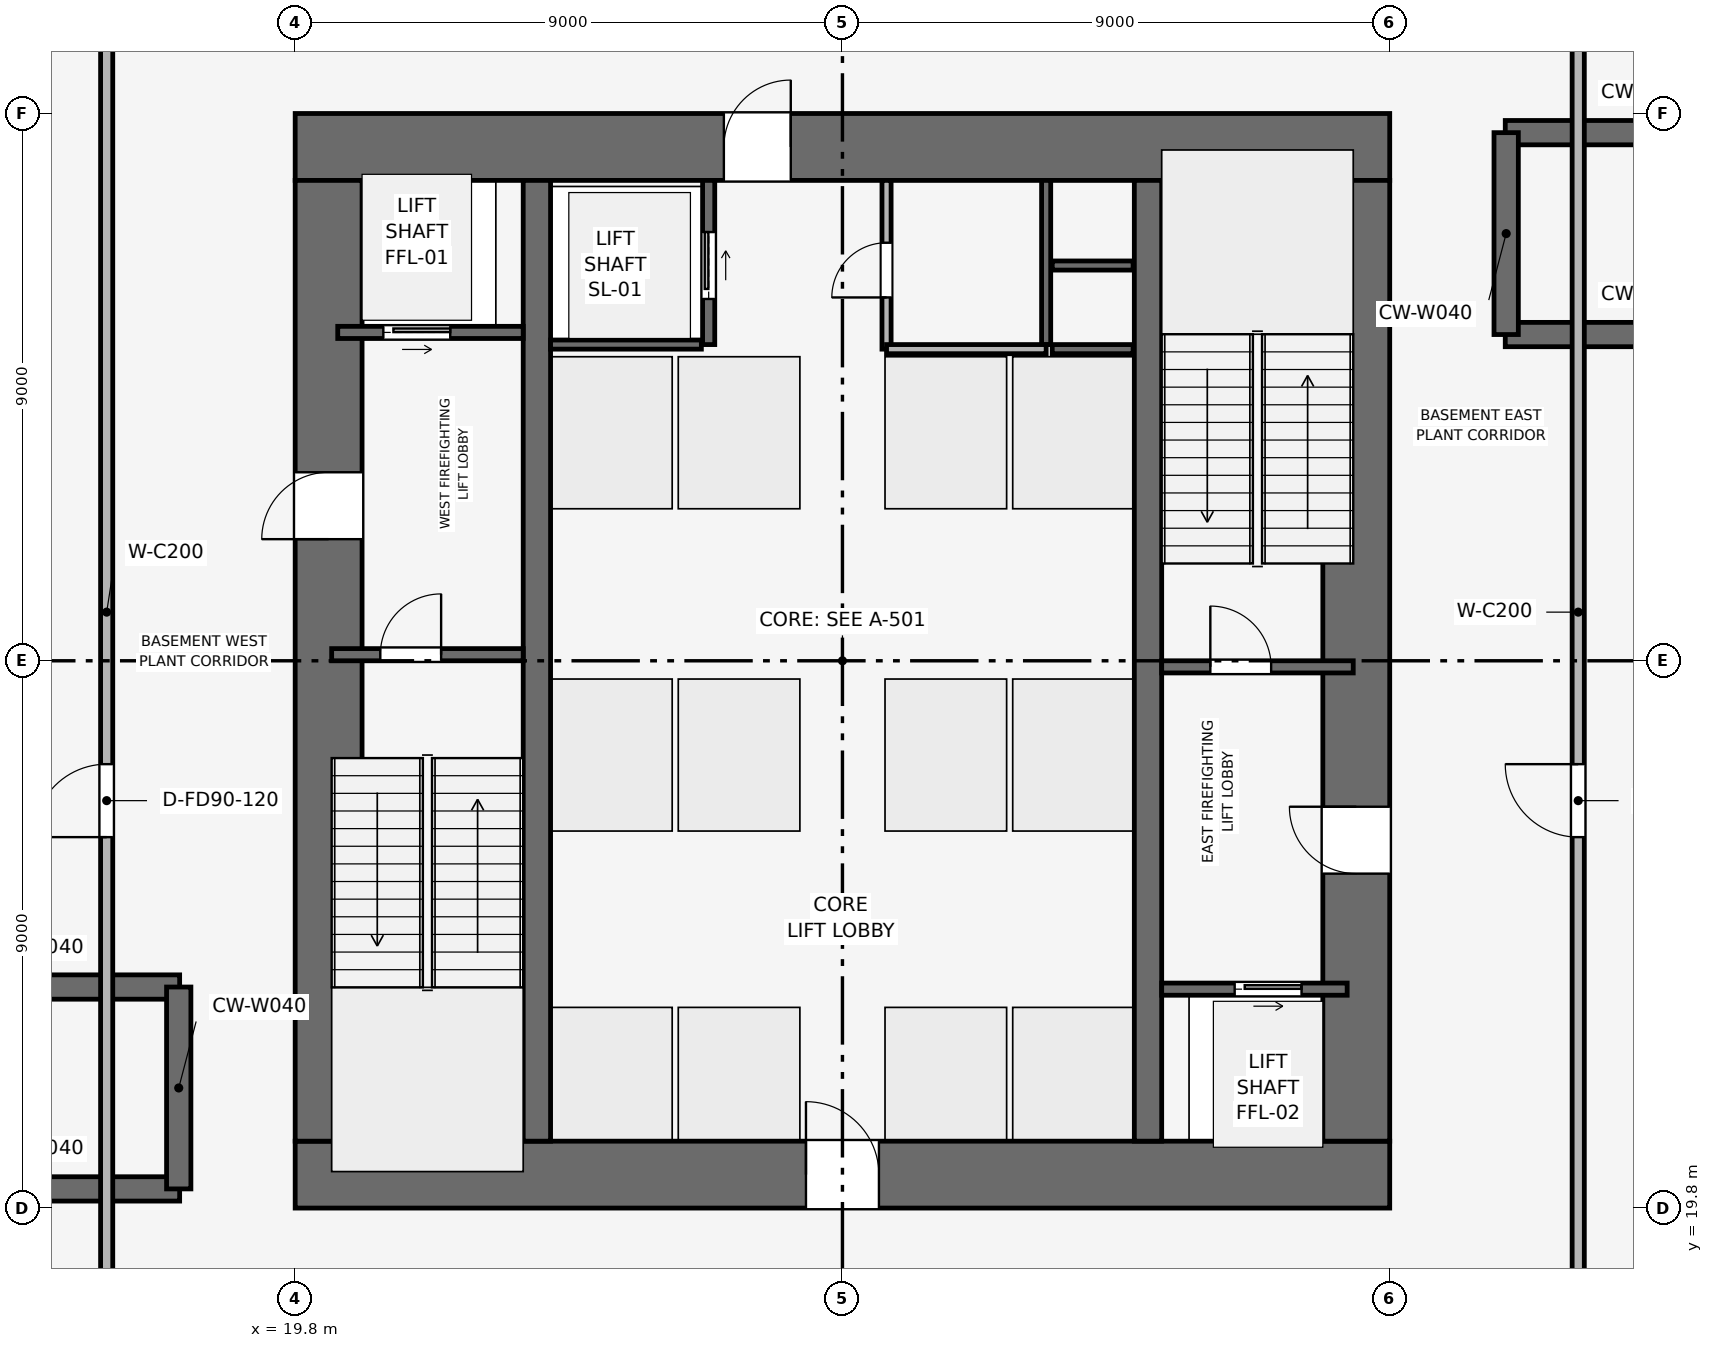
"""IFC4 building model, lengths in metres.
Left out: names, types, materials, properties, quantities, classifications, styles, units other than length and angle.
Written with IfcOpenShell. Run it as: python <this file> out.ifc"""

import sys

from ifc_helpers import new_model, si_unit, direction, frame, frame_2d, origin, place, context, subcontext, project, spatial, rectangle, extrude, element, fill, save


model = new_model("IFC4")
c1 = context("Model", 3, precision=1e-05, world=origin(), true_north=direction((0.0, 1.0)))
c2 = subcontext(c1, "Body", "Model", "MODEL_VIEW")
j1 = project(units=[si_unit("LENGTHUNIT", "METRE"), si_unit("PLANEANGLEUNIT", "RADIAN")], contexts=[c1])
p1 = place(None, origin())
s1 = spatial("IfcSite", under=j1, at=p1, CompositionType="ELEMENT")
p2 = place(p1, origin())
s2 = spatial("IfcBuilding", under=s1, at=p2, CompositionType="ELEMENT")
p3 = place(p2, frame((0.0, 0.0, -9.6)))
s3 = spatial("IfcBuildingStorey", under=s2, at=p3, CompositionType="ELEMENT", Elevation=-9.6)
p4 = place(p3, frame((19.8, 20.35, 0.0), z_axis=(0.0, 0.0, 1.0), x_axis=(1.0, 0.0, 0.0)))
e1 = element("IfcWall", 1, at=p4, inside=s3, PredefinedType="SHEAR", context=c2, shape_type="SweptSolid", body=[
    extrude(rectangle(XDim=18.0, YDim=1.1, at=frame_2d((9.0, 0.0))), origin(), (0.0, 0.0, 1.0), 4.8),
])
p5 = place(p4, frame((8.4, 0.0, 0.0)))
e2 = element("IfcOpeningElement", 2, at=p5, cuts=e1, PredefinedType="OPENING", context=c2, shape_type="SweptSolid", body=[
    extrude(rectangle(XDim=1.2, YDim=2.2, at=frame_2d((0.6, 1.1))), frame((0.0, 0.56, 0.0), z_axis=(0.0, -1.0, 0.0), x_axis=(1.0, 0.0, 0.0)), (0.0, 0.0, 1.0), 1.12),
])
p6 = place(p3, frame((19.8, 37.25, 0.0), z_axis=(0.0, 0.0, 1.0), x_axis=(1.0, 0.0, 0.0)))
e3 = element("IfcWall", 3, at=p6, inside=s3, PredefinedType="SHEAR", context=c2, shape_type="SweptSolid", body=[
    extrude(rectangle(XDim=18.0, YDim=1.1, at=frame_2d((9.0, 0.0))), origin(), (0.0, 0.0, 1.0), 4.8),
])
p7 = place(p6, frame((7.05, 0.0, 0.0)))
e4 = element("IfcOpeningElement", 4, at=p7, cuts=e3, PredefinedType="OPENING", context=c2, shape_type="SweptSolid", body=[
    extrude(rectangle(XDim=1.1, YDim=2.15, at=frame_2d((0.55, 1.075))), frame((0.0, 0.56, 0.0), z_axis=(0.0, -1.0, 0.0), x_axis=(1.0, 0.0, 0.0)), (0.0, 0.0, 1.0), 1.12),
])
p8 = place(p3, frame((20.35, 20.9, 0.0), z_axis=(0.0, 0.0, 1.0), x_axis=(0.0, 1.0, 0.0)))
e5 = element("IfcWall", 5, at=p8, inside=s3, PredefinedType="SHEAR", context=c2, shape_type="SweptSolid", body=[
    extrude(rectangle(XDim=15.8, YDim=1.1, at=frame_2d((7.9, 0.0))), origin(), (0.0, 0.0, 1.0), 4.8),
])
p9 = place(p8, frame((9.9, 0.0, 0.0)))
e6 = element("IfcOpeningElement", 6, at=p9, cuts=e5, PredefinedType="OPENING", context=c2, shape_type="SweptSolid", body=[
    extrude(rectangle(XDim=1.1, YDim=2.15, at=frame_2d((0.55, 1.075))), frame((0.0, 0.56, 0.0), z_axis=(0.0, -1.0, 0.0), x_axis=(1.0, 0.0, 0.0)), (0.0, 0.0, 1.0), 1.12),
])
p10 = place(p3, frame((37.25, 20.9, 0.0), z_axis=(0.0, 0.0, 1.0), x_axis=(0.0, 1.0, 0.0)))
e7 = element("IfcWall", 7, at=p10, inside=s3, PredefinedType="SHEAR", context=c2, shape_type="SweptSolid", body=[
    extrude(rectangle(XDim=15.8, YDim=1.1, at=frame_2d((7.9, 0.0))), origin(), (0.0, 0.0, 1.0), 4.8),
])
p11 = place(p10, frame((4.4, 0.0, 0.0)))
e8 = element("IfcOpeningElement", 8, at=p11, cuts=e7, PredefinedType="OPENING", context=c2, shape_type="SweptSolid", body=[
    extrude(rectangle(XDim=1.1, YDim=2.15, at=frame_2d((0.55, 1.075))), frame((0.0, 0.56, 0.0), z_axis=(0.0, -1.0, 0.0), x_axis=(1.0, 0.0, 0.0)), (0.0, 0.0, 1.0), 1.12),
])
for number, where, z_axis, x_axis in (
    (9, (23.775, 20.9, 0.0), (0.0, 0.0, 1.0), (0.0, 1.0, 0.0)),
    (10, (33.825, 20.9, 0.0), (0.0, 0.0, 1.0), (0.0, 1.0, 0.0)),
):
    element("IfcWall", number, at=place(p3, frame(where, z_axis=z_axis, x_axis=x_axis)), inside=s3, PredefinedType="SHEAR", context=c2, shape_type="SweptSolid", body=[
        extrude(rectangle(XDim=15.8, YDim=0.45, at=frame_2d((7.9, 0.0))), origin(), (0.0, 0.0, 1.0), 4.8),
    ])
for number, where, z_axis, x_axis in (
    (11, (13.2, 20.115, 0.0), (0.0, 0.0, 1.0), (1.0, 0.0, 0.0)),
    (12, (13.2, 23.435, 0.0), (0.0, 0.0, 1.0), (1.0, 0.0, 0.0)),
):
    element("IfcWall", number, at=place(p3, frame(where, z_axis=z_axis, x_axis=x_axis)), inside=s3, PredefinedType="SHEAR", context=c2, shape_type="SweptSolid", body=[
        extrude(rectangle(XDim=4.7, YDim=0.4, at=frame_2d((2.35, 0.0))), origin(), (0.0, 0.0, 1.0), 4.448),
    ])
p12 = place(p3, frame((17.885, 20.115, 0.0), z_axis=(0.0, 0.0, 1.0), x_axis=(0.0, 1.0, 0.0)))
e13 = element("IfcWall", 13, at=p12, inside=s3, PredefinedType="SHEAR", context=c2, shape_type="SweptSolid", body=[
    extrude(rectangle(XDim=3.32, YDim=0.4, at=frame_2d((1.66, 0.0))), origin(), (0.0, 0.0, 1.0), 4.448),
])
for number, where, z_axis, x_axis in (
    (14, (39.7, 34.165, 0.0), (0.0, 0.0, 1.0), (1.0, 0.0, 0.0)),
    (15, (39.7, 37.485, 0.0), (0.0, 0.0, 1.0), (1.0, 0.0, 0.0)),
):
    element("IfcWall", number, at=place(p3, frame(where, z_axis=z_axis, x_axis=x_axis)), inside=s3, PredefinedType="SHEAR", context=c2, shape_type="SweptSolid", body=[
        extrude(rectangle(XDim=4.7, YDim=0.4, at=frame_2d((2.35, 0.0))), origin(), (0.0, 0.0, 1.0), 4.448),
    ])
p13 = place(p3, frame((39.715, 34.165, 0.0), z_axis=(0.0, 0.0, 1.0), x_axis=(0.0, 1.0, 0.0)))
e16 = element("IfcWall", 16, at=p13, inside=s3, PredefinedType="SHEAR", context=c2, shape_type="SweptSolid", body=[
    extrude(rectangle(XDim=3.32, YDim=0.4, at=frame_2d((1.66, 0.0))), origin(), (0.0, 0.0, 1.0), 4.448),
])
p14 = place(p3, frame((20.4, 28.9, 0.0), z_axis=(0.0, 0.0, 1.0), x_axis=(1.0, 0.0, 0.0)))
e17 = element("IfcWall", 17, at=p14, inside=s3, PredefinedType="SHEAR", context=c2, shape_type="SweptSolid", body=[
    extrude(rectangle(XDim=3.15, YDim=0.2, at=frame_2d((1.575, 0.0))), origin(), (0.0, 0.0, 1.0), 4.45),
])
p15 = place(p14, frame((0.8, 0.0, 0.0)))
e18 = element("IfcOpeningElement", 18, at=p15, cuts=e17, PredefinedType="OPENING", context=c2, shape_type="SweptSolid", body=[
    extrude(rectangle(XDim=1.0, YDim=2.1, at=frame_2d((0.5, 1.05))), frame((0.0, 0.11, 0.0), z_axis=(0.0, -1.0, 0.0), x_axis=(1.0, 0.0, 0.0)), (0.0, 0.0, 1.0), 0.22),
])
p16 = place(p3, frame((34.05, 28.7, 0.0), z_axis=(0.0, 0.0, 1.0), x_axis=(1.0, 0.0, 0.0)))
e19 = element("IfcWall", 19, at=p16, inside=s3, PredefinedType="SHEAR", context=c2, shape_type="SweptSolid", body=[
    extrude(rectangle(XDim=3.15, YDim=0.2, at=frame_2d((1.575, 0.0))), origin(), (0.0, 0.0, 1.0), 4.45),
])
p17 = place(p16, frame((0.8, 0.0, 0.0)))
e20 = element("IfcOpeningElement", 20, at=p17, cuts=e19, PredefinedType="OPENING", context=c2, shape_type="SweptSolid", body=[
    extrude(rectangle(XDim=1.0, YDim=2.1, at=frame_2d((0.5, 1.05))), frame((0.0, 0.11, 0.0), z_axis=(0.0, -1.0, 0.0), x_axis=(1.0, 0.0, 0.0)), (0.0, 0.0, 1.0), 0.22),
])
p18 = place(p3, frame((32.15, 34.0, 0.0), z_axis=(0.0, 0.0, 1.0), x_axis=(0.0, 1.0, 0.0)))
e21 = element("IfcWall", 21, at=p18, inside=s3, PredefinedType="SHEAR", context=c2, shape_type="SweptSolid", body=[
    extrude(rectangle(XDim=2.7, YDim=0.15, at=frame_2d((1.35, 0.0))), origin(), (0.0, 0.0, 1.0), 4.45),
])
for number, where, z_axis, x_axis in (
    (22, (32.25, 33.925, 0.0), (0.0, 0.0, 1.0), (1.0, 0.0, 0.0)),
    (23, (32.25, 35.3, 0.0), (0.0, 0.0, 1.0), (1.0, 0.0, 0.0)),
):
    element("IfcWall", number, at=place(p3, frame(where, z_axis=z_axis, x_axis=x_axis)), inside=s3, PredefinedType="SHEAR", context=c2, shape_type="SweptSolid", body=[
        extrude(rectangle(XDim=1.33, YDim=0.15, at=frame_2d((0.665, 0.0))), origin(), (0.0, 0.0, 1.0), 4.45),
    ])
p19 = place(p3, frame((20.5, 34.2, 0.0), z_axis=(0.0, 0.0, 1.0), x_axis=(1.0, 0.0, 0.0)))
e24 = element("IfcWall", 24, at=p19, inside=s3, PredefinedType="SHEAR", context=c2, shape_type="SweptSolid", body=[
    extrude(rectangle(XDim=3.05, YDim=0.2, at=frame_2d((1.525, 0.0))), origin(), (0.0, 0.0, 1.0), 4.45),
])
p20 = place(p19, frame((0.75, 0.0, 0.0)))
e25 = element("IfcOpeningElement", 25, at=p20, cuts=e24, PredefinedType="OPENING", context=c2, shape_type="SweptSolid", body=[
    extrude(rectangle(XDim=1.1, YDim=2.15, at=frame_2d((0.55, 1.075))), frame((0.0, 0.11, 0.0), z_axis=(0.0, -1.0, 0.0), x_axis=(1.0, 0.0, 0.0)), (0.0, 0.0, 1.0), 0.22),
])
p21 = place(p3, frame((34.05, 23.4, 0.0), z_axis=(0.0, 0.0, 1.0), x_axis=(1.0, 0.0, 0.0)))
e26 = element("IfcWall", 26, at=p21, inside=s3, PredefinedType="SHEAR", context=c2, shape_type="SweptSolid", body=[
    extrude(rectangle(XDim=3.05, YDim=0.2, at=frame_2d((1.525, 0.0))), origin(), (0.0, 0.0, 1.0), 4.45),
])
p22 = place(p21, frame((1.2, 0.0, 0.0)))
e27 = element("IfcOpeningElement", 27, at=p22, cuts=e26, PredefinedType="OPENING", context=c2, shape_type="SweptSolid", body=[
    extrude(rectangle(XDim=1.1, YDim=2.15, at=frame_2d((0.55, 1.075))), frame((0.0, 0.11, 0.0), z_axis=(0.0, -1.0, 0.0), x_axis=(1.0, 0.0, 0.0)), (0.0, 0.0, 1.0), 0.22),
])
p23 = place(p3, frame((26.6, 34.0, 0.0), z_axis=(0.0, 0.0, 1.0), x_axis=(0.0, 1.0, 0.0)))
e28 = element("IfcWall", 28, at=p23, inside=s3, PredefinedType="SHEAR", context=c2, shape_type="SweptSolid", body=[
    extrude(rectangle(XDim=2.7, YDim=0.2, at=frame_2d((1.35, 0.0))), origin(), (0.0, 0.0, 1.0), 4.45),
])
p24 = place(p23, frame((0.75, 0.0, 0.0)))
e29 = element("IfcOpeningElement", 29, at=p24, cuts=e28, PredefinedType="OPENING", context=c2, shape_type="SweptSolid", body=[
    extrude(rectangle(XDim=1.1, YDim=2.15, at=frame_2d((0.55, 1.075))), frame((0.0, 0.11, 0.0), z_axis=(0.0, -1.0, 0.0), x_axis=(1.0, 0.0, 0.0)), (0.0, 0.0, 1.0), 0.22),
])
p25 = place(p3, frame((24.0, 34.0, 0.0), z_axis=(0.0, 0.0, 1.0), x_axis=(1.0, 0.0, 0.0)))
e30 = element("IfcWall", 30, at=p25, inside=s3, PredefinedType="SHEAR", context=c2, shape_type="SweptSolid", body=[
    extrude(rectangle(XDim=2.48, YDim=0.15, at=frame_2d((1.24, 0.0))), origin(), (0.0, 0.0, 1.0), 4.45),
])
p26 = place(p3, frame((29.525, 33.925, 0.0), z_axis=(0.0, 0.0, 1.0), x_axis=(0.0, 1.0, 0.0)))
e31 = element("IfcWall", 31, at=p26, inside=s3, PredefinedType="PARTITIONING", context=c2, shape_type="SweptSolid", body=[
    extrude(rectangle(XDim=2.775, YDim=0.15, at=frame_2d((1.387, 0.0))), origin(), (0.0, 0.0, 1.0), 4.45),
])
p27 = place(p26, frame((0.85, 0.0, 0.0)))
e32 = element("IfcOpeningElement", 32, at=p27, cuts=e31, PredefinedType="OPENING", context=c2, shape_type="SweptSolid", body=[
    extrude(rectangle(XDim=0.9, YDim=2.1, at=frame_2d((0.45, 1.05))), frame((0.0, 0.085, 0.0), z_axis=(0.0, -1.0, 0.0), x_axis=(1.0, 0.0, 0.0)), (0.0, 0.0, 1.0), 0.17),
])
p28 = place(p3, frame((29.525, 33.925, 0.0), z_axis=(0.0, 0.0, 1.0), x_axis=(1.0, 0.0, 0.0)))
e33 = element("IfcWall", 33, at=p28, inside=s3, PredefinedType="PARTITIONING", context=c2, shape_type="SweptSolid", body=[
    extrude(rectangle(XDim=2.625, YDim=0.15, at=frame_2d((1.312, 0.0))), origin(), (0.0, 0.0, 1.0), 4.45),
])
p29 = place(p3, frame((16.7, 16.7, 0.0), z_axis=(0.0, 0.0, 1.0), x_axis=(0.0, 1.0, 0.0)))
e34 = element("IfcWall", 34, at=p29, inside=s3, PredefinedType="PARTITIONING", context=c2, shape_type="SweptSolid", body=[
    extrude(rectangle(XDim=24.2, YDim=0.2, at=frame_2d((12.1, 0.0))), origin(), (0.0, 0.0, 1.0), 3.035),
])
p30 = place(p29, frame((9.2, 0.0, 0.0)))
e35 = element("IfcOpeningElement", 35, at=p30, cuts=e34, PredefinedType="OPENING", context=c2, shape_type="SweptSolid", body=[
    extrude(rectangle(XDim=1.2, YDim=2.2, at=frame_2d((0.6, 1.1))), frame((0.0, 0.11, 0.0), z_axis=(0.0, -1.0, 0.0), x_axis=(1.0, 0.0, 0.0)), (0.0, 0.0, 1.0), 0.22),
])
p31 = place(p3, frame((40.9, 16.7, 0.0), z_axis=(0.0, 0.0, 1.0), x_axis=(0.0, 1.0, 0.0)))
e36 = element("IfcWall", 36, at=p31, inside=s3, PredefinedType="PARTITIONING", context=c2, shape_type="SweptSolid", body=[
    extrude(rectangle(XDim=24.2, YDim=0.2, at=frame_2d((12.1, 0.0))), origin(), (0.0, 0.0, 1.0), 3.035),
])
p32 = place(p31, frame((9.2, 0.0, 0.0)))
e37 = element("IfcOpeningElement", 37, at=p32, cuts=e36, PredefinedType="OPENING", context=c2, shape_type="SweptSolid", body=[
    extrude(rectangle(XDim=1.2, YDim=2.2, at=frame_2d((0.6, 1.1))), frame((0.0, 0.11, 0.0), z_axis=(0.0, -1.0, 0.0), x_axis=(1.0, 0.0, 0.0)), (0.0, 0.0, 1.0), 0.22),
])
p33 = place(p15, origin())
e38 = element("IfcDoor", 38, at=p33, inside=s3, OperationType="SINGLE_SWING_RIGHT", PredefinedType="DOOR", context=c2, shape_type="SweptSolid", body=[
    extrude(rectangle(XDim=1.0, YDim=2.1, at=frame_2d((0.5, 1.05))), frame((0.0, 0.025, 0.0), z_axis=(0.0, -1.0, 0.0), x_axis=(1.0, 0.0, 0.0)), (0.0, 0.0, 1.0), 0.05),
])
fill(e18, e38)
p34 = place(p17, origin())
e39 = element("IfcDoor", 39, at=p34, inside=s3, OperationType="SINGLE_SWING_LEFT", PredefinedType="DOOR", context=c2, shape_type="SweptSolid", body=[
    extrude(rectangle(XDim=1.0, YDim=2.1, at=frame_2d((0.5, 1.05))), frame((0.0, 0.025, 0.0), z_axis=(0.0, -1.0, 0.0), x_axis=(1.0, 0.0, 0.0)), (0.0, 0.0, 1.0), 0.05),
])
fill(e20, e39)
p35 = place(p20, origin())
e40 = element("IfcDoor", 40, at=p35, inside=s3, OperationType="SLIDING_TO_RIGHT", PredefinedType="DOOR", context=c2, shape_type="SweptSolid", body=[
    extrude(rectangle(XDim=1.1, YDim=2.15, at=frame_2d((0.55, 1.075))), frame((0.0, 0.025, 0.0), z_axis=(0.0, -1.0, 0.0), x_axis=(1.0, 0.0, 0.0)), (0.0, 0.0, 1.0), 0.05),
])
fill(e25, e40)
p36 = place(p22, origin())
e41 = element("IfcDoor", 41, at=p36, inside=s3, OperationType="SLIDING_TO_RIGHT", PredefinedType="DOOR", context=c2, shape_type="SweptSolid", body=[
    extrude(rectangle(XDim=1.1, YDim=2.15, at=frame_2d((0.55, 1.075))), frame((0.0, 0.025, 0.0), z_axis=(0.0, -1.0, 0.0), x_axis=(1.0, 0.0, 0.0)), (0.0, 0.0, 1.0), 0.05),
])
fill(e27, e41)
p37 = place(p24, origin())
e42 = element("IfcDoor", 42, at=p37, inside=s3, OperationType="SLIDING_TO_RIGHT", PredefinedType="DOOR", context=c2, shape_type="SweptSolid", body=[
    extrude(rectangle(XDim=1.1, YDim=2.15, at=frame_2d((0.55, 1.075))), frame((0.0, 0.025, 0.0), z_axis=(0.0, -1.0, 0.0), x_axis=(1.0, 0.0, 0.0)), (0.0, 0.0, 1.0), 0.05),
])
fill(e29, e42)
p38 = place(p27, origin())
e43 = element("IfcDoor", 43, at=p38, inside=s3, OperationType="SINGLE_SWING_LEFT", PredefinedType="DOOR", context=c2, shape_type="SweptSolid", body=[
    extrude(rectangle(XDim=0.9, YDim=2.1, at=frame_2d((0.45, 1.05))), frame((0.0, 0.025, 0.0), z_axis=(0.0, -1.0, 0.0), x_axis=(1.0, 0.0, 0.0)), (0.0, 0.0, 1.0), 0.05),
])
fill(e32, e43)
p39 = place(p30, origin())
e44 = element("IfcDoor", 44, at=p39, inside=s3, OperationType="SINGLE_SWING_LEFT", PredefinedType="DOOR", context=c2, shape_type="SweptSolid", body=[
    extrude(rectangle(XDim=1.2, YDim=2.2, at=frame_2d((0.6, 1.1))), frame((0.0, 0.025, 0.0), z_axis=(0.0, -1.0, 0.0), x_axis=(1.0, 0.0, 0.0)), (0.0, 0.0, 1.0), 0.05),
])
fill(e35, e44)
p40 = place(p32, origin())
e45 = element("IfcDoor", 45, at=p40, inside=s3, OperationType="SINGLE_SWING_RIGHT", PredefinedType="DOOR", context=c2, shape_type="SweptSolid", body=[
    extrude(rectangle(XDim=1.2, YDim=2.2, at=frame_2d((0.6, 1.1))), frame((0.0, 0.025, 0.0), z_axis=(0.0, -1.0, 0.0), x_axis=(1.0, 0.0, 0.0)), (0.0, 0.0, 1.0), 0.05),
])
fill(e37, e45)
p41 = place(p9, origin())
e46 = element("IfcDoor", 46, at=p41, inside=s3, OperationType="SINGLE_SWING_LEFT", PredefinedType="DOOR", context=c2, shape_type="SweptSolid", body=[
    extrude(rectangle(XDim=1.1, YDim=2.15, at=frame_2d((0.55, 1.075))), frame((0.0, 0.025, 0.0), z_axis=(0.0, -1.0, 0.0), x_axis=(1.0, 0.0, 0.0)), (0.0, 0.0, 1.0), 0.05),
])
fill(e6, e46)
p42 = place(p11, origin())
e47 = element("IfcDoor", 47, at=p42, inside=s3, OperationType="SINGLE_SWING_RIGHT", PredefinedType="DOOR", context=c2, shape_type="SweptSolid", body=[
    extrude(rectangle(XDim=1.1, YDim=2.15, at=frame_2d((0.55, 1.075))), frame((0.0, 0.025, 0.0), z_axis=(0.0, -1.0, 0.0), x_axis=(1.0, 0.0, 0.0)), (0.0, 0.0, 1.0), 0.05),
])
fill(e8, e47)
p43 = place(p5, origin())
e48 = element("IfcDoor", 48, at=p43, inside=s3, OperationType="SINGLE_SWING_LEFT", PredefinedType="DOOR", context=c2, shape_type="SweptSolid", body=[
    extrude(rectangle(XDim=1.2, YDim=2.2, at=frame_2d((0.6, 1.1))), frame((0.0, 0.025, 0.0), z_axis=(0.0, -1.0, 0.0), x_axis=(1.0, 0.0, 0.0)), (0.0, 0.0, 1.0), 0.05),
])
fill(e2, e48)
p44 = place(p7, origin())
e49 = element("IfcDoor", 49, at=p44, inside=s3, OperationType="SINGLE_SWING_RIGHT", PredefinedType="DOOR", context=c2, shape_type="SweptSolid", body=[
    extrude(rectangle(XDim=1.1, YDim=2.15, at=frame_2d((0.55, 1.075))), frame((0.0, 0.025, 0.0), z_axis=(0.0, -1.0, 0.0), x_axis=(1.0, 0.0, 0.0)), (0.0, 0.0, 1.0), 0.05),
])
fill(e4, e49)
save(model, sys.argv[1])
